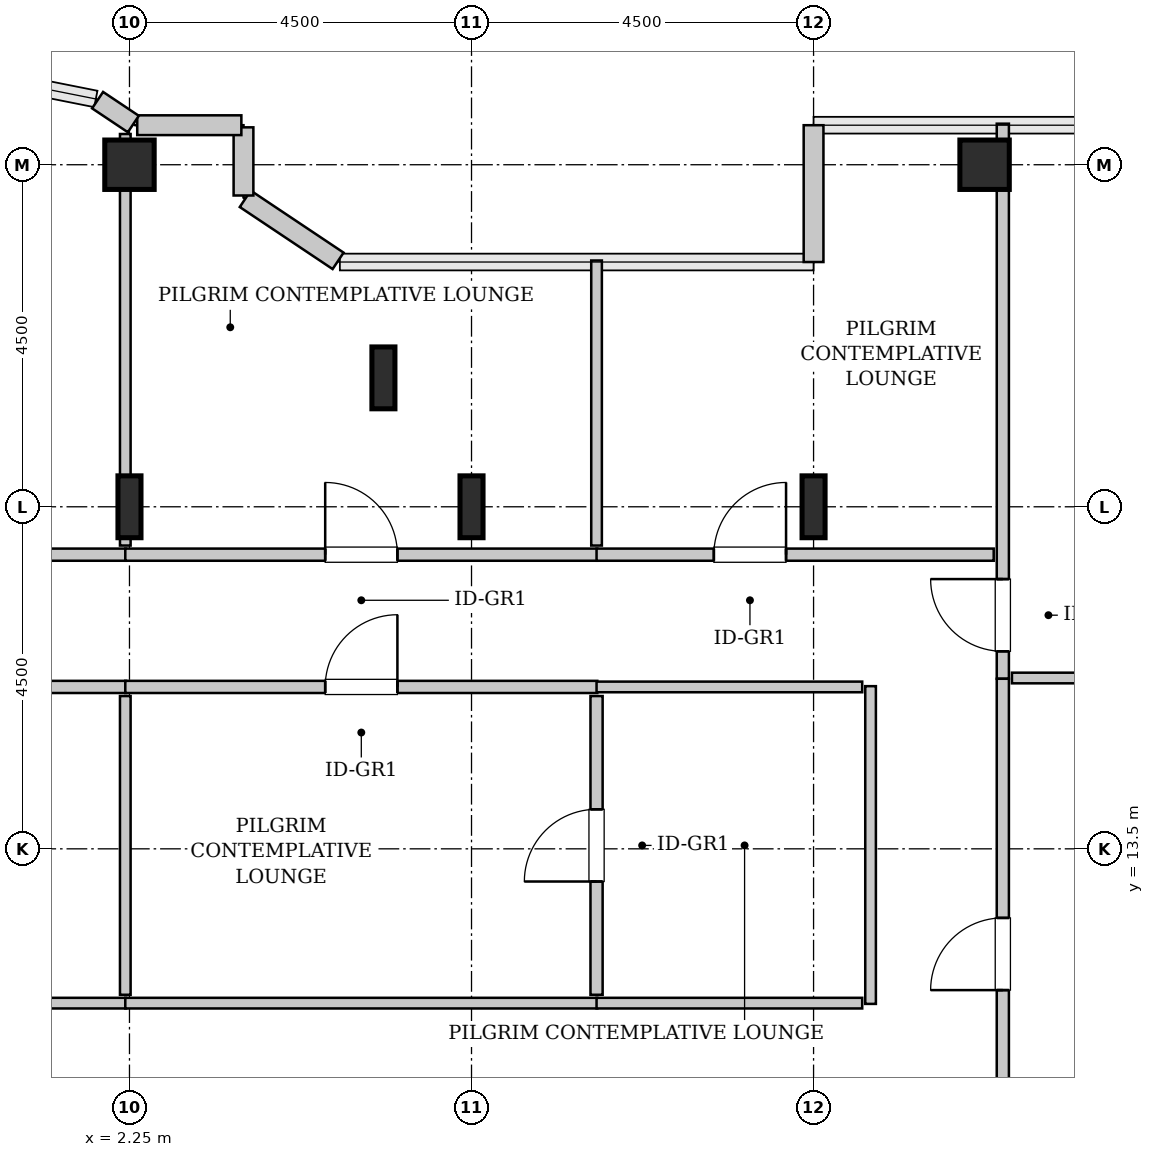
"""IFC4 building model, lengths in metres.
Left out: names, types, materials, properties, quantities, classifications, styles, units other than length and angle.
Written with IfcOpenShell. Run it as: python <this file> out.ifc"""

import sys

from ifc_helpers import new_model, si_unit, direction, frame, frame_2d, origin, origin_2d, place, context, subcontext, project, spatial, rectangle, hollow_rectangle, i_section, extrude, source, transform, mapped, element, fill, save


model = new_model("IFC4")
c1 = context("Model", 3, precision=1e-05, world=origin(), true_north=direction((0.0, 1.0)))
c2 = subcontext(c1, "Body", "Model", "MODEL_VIEW")
j1 = project(units=[si_unit("LENGTHUNIT", "METRE"), si_unit("PLANEANGLEUNIT", "RADIAN")], contexts=[c1])
p1 = place(None, origin())
s1 = spatial("IfcSite", under=j1, at=p1, CompositionType="ELEMENT")
p2 = place(p1, origin())
s2 = spatial("IfcBuilding", under=s1, at=p2, CompositionType="ELEMENT")
p3 = place(p2, frame((0.0, 0.0, 244.6)))
s3 = spatial("IfcBuildingStorey", under=s2, at=p3, CompositionType="ELEMENT", Elevation=244.6)
m1 = source(origin(), c2, "Body", "SweptSolid", [
    extrude(i_section(OverallWidth=0.303, OverallDepth=0.814, WebThickness=0.021, FlangeThickness=0.04, FilletRadius=0.03, at=origin_2d()), origin(), (0.0, 0.0, 1.0), 3.8),
])
p4 = place(p3, frame((2.25, 18.0, 0.0), z_axis=(0.0, 0.0, 1.0), x_axis=(1.0, 0.0, 0.0)))
e1 = element("IfcColumn", 1, at=p4, inside=s3, PredefinedType="COLUMN", context=c2, shape_type="MappedRepresentation", body=[
    mapped(m1, transform((0.0, 0.0, 0.0), x_axis=(1.0, 0.0, 0.0), y_axis=(0.0, 1.0, 0.0), z_axis=(0.0, 0.0, 1.0), scale=1.0)),
])
m2 = source(origin(), c2, "Body", "SweptSolid", [
    extrude(hollow_rectangle(XDim=0.65, YDim=0.65, WallThickness=0.032, InnerFilletRadius=0.032, OuterFilletRadius=0.064, at=origin_2d()), origin(), (0.0, 0.0, 1.0), 3.8),
])
p5 = place(p3, frame((2.25, 22.5, 0.0), z_axis=(0.0, 0.0, 1.0), x_axis=(1.0, 0.0, 0.0)))
e2 = element("IfcColumn", 2, at=p5, inside=s3, PredefinedType="COLUMN", context=c2, shape_type="MappedRepresentation", body=[
    mapped(m2, transform((0.0, 0.0, 0.0), x_axis=(1.0, 0.0, 0.0), y_axis=(0.0, 1.0, 0.0), z_axis=(0.0, 0.0, 1.0), scale=1.0)),
])
for number, where, z_axis, x_axis in (
    (3, (5.591, 19.696, 0.0), (0.0, 0.0, 1.0), (1.0, 0.0, 0.0)),
    (4, (6.75, 18.0, 0.0), (0.0, 0.0, 1.0), (1.0, 0.0, 0.0)),
    (5, (11.25, 18.0, 0.0), (0.0, 0.0, 1.0), (1.0, 0.0, 0.0)),
):
    element("IfcColumn", number, at=place(p3, frame(where, z_axis=z_axis, x_axis=x_axis)), inside=s3, PredefinedType="COLUMN", context=c2, shape_type="MappedRepresentation", body=[
        mapped(m1, transform((0.0, 0.0, 0.0), x_axis=(1.0, 0.0, 0.0), y_axis=(0.0, 1.0, 0.0), z_axis=(0.0, 0.0, 1.0), scale=1.0)),
    ])
p6 = place(p3, frame((13.5, 22.5, 0.0), z_axis=(0.0, 0.0, 1.0), x_axis=(1.0, 0.0, 0.0)))
e6 = element("IfcColumn", 6, at=p6, inside=s3, PredefinedType="COLUMN", context=c2, shape_type="MappedRepresentation", body=[
    mapped(m2, transform((0.0, 0.0, 0.0), x_axis=(1.0, 0.0, 0.0), y_axis=(0.0, 1.0, 0.0), z_axis=(0.0, 0.0, 1.0), scale=1.0)),
])
m3 = source(origin(), c2, "Body", "SweptSolid", [
    extrude(rectangle(XDim=1.8, YDim=0.26, at=frame_2d((0.9, 0.0))), origin(), (0.0, 0.0, 1.0), 3.55),
])
p7 = place(p3, frame((11.25, 23.02, 0.0), z_axis=(0.0, 0.0, 1.0), x_axis=(0.0, -1.0, 0.0)))
e7 = element("IfcWall", 7, at=p7, inside=s3, PredefinedType="SOLIDWALL", context=c2, shape_type="MappedRepresentation", body=[
    mapped(m3, transform((0.0, 0.0, 0.0), x_axis=(1.0, 0.0, 0.0), y_axis=(0.0, 1.0, 0.0), z_axis=(0.0, 0.0, 1.0), scale=1.0)),
])
m4 = source(origin(), c2, "Body", "SweptSolid", [
    extrude(rectangle(XDim=1.469, YDim=0.26, at=frame_2d((0.734, 0.0))), origin(), (0.0, 0.0, 1.0), 3.55),
])
p8 = place(p3, frame((4.995, 21.236, 0.0), z_axis=(0.0, 0.0, 1.0), x_axis=(-0.831461760506, 0.555581983884, 0.0)))
e8 = element("IfcWall", 8, at=p8, inside=s3, PredefinedType="SOLIDWALL", context=c2, shape_type="MappedRepresentation", body=[
    mapped(m4, transform((0.0, 0.0, 0.0), x_axis=(1.0, 0.0, 0.0), y_axis=(0.0, 1.0, 0.0), z_axis=(0.0, 0.0, 1.0), scale=1.0)),
])
m5 = source(origin(), c2, "Body", "SweptSolid", [
    extrude(rectangle(XDim=0.897, YDim=0.26, at=frame_2d((0.448, 0.0))), origin(), (0.0, 0.0, 1.0), 3.55),
])
p9 = place(p3, frame((3.75, 22.095, 0.0), z_axis=(0.0, 0.0, 1.0), x_axis=(0.0, 1.0, 0.0)))
e9 = element("IfcWall", 9, at=p9, inside=s3, PredefinedType="SOLIDWALL", context=c2, shape_type="MappedRepresentation", body=[
    mapped(m5, transform((0.0, 0.0, 0.0), x_axis=(1.0, 0.0, 0.0), y_axis=(0.0, 1.0, 0.0), z_axis=(0.0, 0.0, 1.0), scale=1.0)),
])
m6 = source(origin(), c2, "Body", "SweptSolid", [
    extrude(rectangle(XDim=1.37, YDim=0.26, at=frame_2d((0.685, 0.0))), origin(), (0.0, 0.0, 1.0), 3.55),
])
p10 = place(p3, frame((3.722, 23.02, 0.0), z_axis=(0.0, 0.0, 1.0), x_axis=(-1.0, 0.0, 0.0)))
e10 = element("IfcWall", 10, at=p10, inside=s3, PredefinedType="SOLIDWALL", context=c2, shape_type="MappedRepresentation", body=[
    mapped(m6, transform((0.0, 0.0, 0.0), x_axis=(1.0, 0.0, 0.0), y_axis=(0.0, 1.0, 0.0), z_axis=(0.0, 0.0, 1.0), scale=1.0)),
])
m7 = source(origin(), c2, "Body", "SweptSolid", [
    extrude(rectangle(XDim=0.565, YDim=0.26, at=frame_2d((0.283, 0.0))), origin(), (0.0, 0.0, 1.0), 3.55),
])
p11 = place(p3, frame((2.301, 23.036, 0.0), z_axis=(0.0, 0.0, 1.0), x_axis=(-0.831651492666, 0.555297933317, 0.0)))
e11 = element("IfcWall", 11, at=p11, inside=s3, PredefinedType="SOLIDWALL", context=c2, shape_type="MappedRepresentation", body=[
    mapped(m7, transform((0.0, 0.0, 0.0), x_axis=(1.0, 0.0, 0.0), y_axis=(0.0, 1.0, 0.0), z_axis=(0.0, 0.0, 1.0), scale=1.0)),
])
m8 = source(origin(), c2, "Body", "SweptSolid", [
    extrude(rectangle(XDim=7.302, YDim=0.16, at=frame_2d((3.651, 0.0))), origin(), (0.0, 0.0, 1.0), 3.535),
])
p12 = place(p3, frame((13.74, 15.738, 0.0), z_axis=(0.0, 0.0, 1.0), x_axis=(0.0, 1.0, 0.0)))
e12 = element("IfcWall", 12, at=p12, inside=s3, PredefinedType="PARTITIONING", context=c2, shape_type="MappedRepresentation", body=[
    mapped(m8, transform((0.0, 0.0, 0.0), x_axis=(1.0, 0.0, 0.0), y_axis=(0.0, 1.0, 0.0), z_axis=(0.0, 0.0, 1.0), scale=1.0)),
])
p13 = place(p12, frame((0.361, 0.0, 0.0)))
e13 = element("IfcOpeningElement", 13, at=p13, cuts=e12, PredefinedType="OPENING", context=c2, shape_type="SweptSolid", body=[
    extrude(rectangle(XDim=0.95, YDim=2.1, at=frame_2d((0.475, 1.05))), frame((0.0, 0.09, 0.0), z_axis=(0.0, -1.0, 0.0), x_axis=(1.0, 0.0, 0.0)), (0.0, 0.0, 1.0), 0.18),
])
m9 = source(origin(), c2, "Body", "SweptSolid", [
    extrude(rectangle(XDim=11.43, YDim=0.14, at=frame_2d((5.715, 0.0))), origin(), (0.0, 0.0, 1.0), 3.535),
])
p14 = place(p3, frame((13.86, 15.748, 0.0), z_axis=(0.0, 0.0, 1.0), x_axis=(1.0, 0.0, 0.0)))
e14 = element("IfcWall", 14, at=p14, inside=s3, PredefinedType="PARTITIONING", context=c2, shape_type="MappedRepresentation", body=[
    mapped(m9, transform((0.0, 0.0, 0.0), x_axis=(1.0, 0.0, 0.0), y_axis=(0.0, 1.0, 0.0), z_axis=(0.0, 0.0, 1.0), scale=1.0)),
])
m10 = source(origin(), c2, "Body", "SweptSolid", [
    extrude(rectangle(XDim=7.242, YDim=0.16, at=frame_2d((3.621, 0.0))), origin(), (0.0, 0.0, 1.0), 3.535),
])
p15 = place(p3, frame((13.74, 8.495, 0.0), z_axis=(0.0, 0.0, 1.0), x_axis=(0.0, 1.0, 0.0)))
e15 = element("IfcWall", 15, at=p15, inside=s3, PredefinedType="PARTITIONING", context=c2, shape_type="MappedRepresentation", body=[
    mapped(m10, transform((0.0, 0.0, 0.0), x_axis=(1.0, 0.0, 0.0), y_axis=(0.0, 1.0, 0.0), z_axis=(0.0, 0.0, 1.0), scale=1.0)),
])
p16 = place(p15, frame((3.146, 0.0, 0.0)))
e16 = element("IfcOpeningElement", 16, at=p16, cuts=e15, PredefinedType="OPENING", context=c2, shape_type="SweptSolid", body=[
    extrude(rectangle(XDim=0.95, YDim=2.1, at=frame_2d((0.475, 1.05))), frame((0.0, 0.09, 0.0), z_axis=(0.0, -1.0, 0.0), x_axis=(1.0, 0.0, 0.0)), (0.0, 0.0, 1.0), 0.18),
])
m11 = source(origin(), c2, "Body", "SweptSolid", [
    extrude(rectangle(XDim=7.21, YDim=0.16, at=frame_2d((3.605, 0.0))), origin(), (0.0, 0.0, 1.0), 3.535),
])
p17 = place(p3, frame((-5.005, 17.37, 0.0), z_axis=(0.0, 0.0, 1.0), x_axis=(1.0, 0.0, 0.0)))
e17 = element("IfcWall", 17, at=p17, inside=s3, PredefinedType="PARTITIONING", context=c2, shape_type="MappedRepresentation", body=[
    mapped(m11, transform((0.0, 0.0, 0.0), x_axis=(1.0, 0.0, 0.0), y_axis=(0.0, 1.0, 0.0), z_axis=(0.0, 0.0, 1.0), scale=1.0)),
])
p18 = place(p17, frame((3.13, 0.0, 0.0)))
e18 = element("IfcOpeningElement", 18, at=p18, cuts=e17, PredefinedType="OPENING", context=c2, shape_type="SweptSolid", body=[
    extrude(rectangle(XDim=0.95, YDim=2.1, at=frame_2d((0.475, 1.05))), frame((0.0, 0.09, 0.0), z_axis=(0.0, -1.0, 0.0), x_axis=(1.0, 0.0, 0.0)), (0.0, 0.0, 1.0), 0.18),
])
m12 = source(origin(), c2, "Body", "SweptSolid", [
    extrude(rectangle(XDim=5.414, YDim=0.14, at=frame_2d((2.707, 0.0))), origin(), (0.0, 0.0, 1.0), 2.925),
])
p19 = place(p3, frame((2.195, 17.49, 0.0), z_axis=(0.0, 0.0, 1.0), x_axis=(0.0, 1.0, 0.0)))
e19 = element("IfcWall", 19, at=p19, inside=s3, PredefinedType="PARTITIONING", context=c2, shape_type="MappedRepresentation", body=[
    mapped(m12, transform((0.0, 0.0, 0.0), x_axis=(1.0, 0.0, 0.0), y_axis=(0.0, 1.0, 0.0), z_axis=(0.0, 0.0, 1.0), scale=1.0)),
])
p20 = place(p3, frame((-5.005, 15.63, 0.0), z_axis=(0.0, 0.0, 1.0), x_axis=(1.0, 0.0, 0.0)))
e20 = element("IfcWall", 20, at=p20, inside=s3, PredefinedType="PARTITIONING", context=c2, shape_type="MappedRepresentation", body=[
    mapped(m11, transform((0.0, 0.0, 0.0), x_axis=(1.0, 0.0, 0.0), y_axis=(0.0, 1.0, 0.0), z_axis=(0.0, 0.0, 1.0), scale=1.0)),
])
p21 = place(p20, frame((3.13, 0.0, 0.0)))
e21 = element("IfcOpeningElement", 21, at=p21, cuts=e20, PredefinedType="OPENING", context=c2, shape_type="SweptSolid", body=[
    extrude(rectangle(XDim=0.95, YDim=2.1, at=frame_2d((0.475, 1.05))), frame((0.0, 0.09, 0.0), z_axis=(0.0, -1.0, 0.0), x_axis=(1.0, 0.0, 0.0)), (0.0, 0.0, 1.0), 0.18),
])
m13 = source(origin(), c2, "Body", "SweptSolid", [
    extrude(rectangle(XDim=7.21, YDim=0.14, at=frame_2d((3.605, 0.0))), origin(), (0.0, 0.0, 1.0), 3.535),
])
p22 = place(p3, frame((-5.005, 11.47, 0.0), z_axis=(0.0, 0.0, 1.0), x_axis=(1.0, 0.0, 0.0)))
e22 = element("IfcWall", 22, at=p22, inside=s3, PredefinedType="PARTITIONING", context=c2, shape_type="MappedRepresentation", body=[
    mapped(m13, transform((0.0, 0.0, 0.0), x_axis=(1.0, 0.0, 0.0), y_axis=(0.0, 1.0, 0.0), z_axis=(0.0, 0.0, 1.0), scale=1.0)),
])
m14 = source(origin(), c2, "Body", "SweptSolid", [
    extrude(rectangle(XDim=3.93, YDim=0.14, at=frame_2d((1.965, 0.0))), origin(), (0.0, 0.0, 1.0), 3.535),
])
p23 = place(p3, frame((2.195, 11.58, 0.0), z_axis=(0.0, 0.0, 1.0), x_axis=(0.0, 1.0, 0.0)))
e23 = element("IfcWall", 23, at=p23, inside=s3, PredefinedType="PARTITIONING", context=c2, shape_type="MappedRepresentation", body=[
    mapped(m14, transform((0.0, 0.0, 0.0), x_axis=(1.0, 0.0, 0.0), y_axis=(0.0, 1.0, 0.0), z_axis=(0.0, 0.0, 1.0), scale=1.0)),
])
m15 = source(origin(), c2, "Body", "SweptSolid", [
    extrude(rectangle(XDim=6.21, YDim=0.16, at=frame_2d((3.105, 0.0))), origin(), (0.0, 0.0, 1.0), 3.535),
])
p24 = place(p3, frame((2.195, 17.37, 0.0), z_axis=(0.0, 0.0, 1.0), x_axis=(1.0, 0.0, 0.0)))
e24 = element("IfcWall", 24, at=p24, inside=s3, PredefinedType="PARTITIONING", context=c2, shape_type="MappedRepresentation", body=[
    mapped(m15, transform((0.0, 0.0, 0.0), x_axis=(1.0, 0.0, 0.0), y_axis=(0.0, 1.0, 0.0), z_axis=(0.0, 0.0, 1.0), scale=1.0)),
])
p25 = place(p24, frame((2.63, 0.0, 0.0)))
e25 = element("IfcOpeningElement", 25, at=p25, cuts=e24, PredefinedType="OPENING", context=c2, shape_type="SweptSolid", body=[
    extrude(rectangle(XDim=0.95, YDim=2.1, at=frame_2d((0.475, 1.05))), frame((0.0, 0.09, 0.0), z_axis=(0.0, -1.0, 0.0), x_axis=(1.0, 0.0, 0.0)), (0.0, 0.0, 1.0), 0.18),
])
m16 = source(origin(), c2, "Body", "SweptSolid", [
    extrude(rectangle(XDim=3.75, YDim=0.14, at=frame_2d((1.875, 0.0))), origin(), (0.0, 0.0, 1.0), 3.535),
])
p26 = place(p3, frame((8.395, 17.49, 0.0), z_axis=(0.0, 0.0, 1.0), x_axis=(0.0, 1.0, 0.0)))
e26 = element("IfcWall", 26, at=p26, inside=s3, PredefinedType="PARTITIONING", context=c2, shape_type="MappedRepresentation", body=[
    mapped(m16, transform((0.0, 0.0, 0.0), x_axis=(1.0, 0.0, 0.0), y_axis=(0.0, 1.0, 0.0), z_axis=(0.0, 0.0, 1.0), scale=1.0)),
])
p27 = place(p3, frame((2.195, 15.63, 0.0), z_axis=(0.0, 0.0, 1.0), x_axis=(1.0, 0.0, 0.0)))
e27 = element("IfcWall", 27, at=p27, inside=s3, PredefinedType="PARTITIONING", context=c2, shape_type="MappedRepresentation", body=[
    mapped(m15, transform((0.0, 0.0, 0.0), x_axis=(1.0, 0.0, 0.0), y_axis=(0.0, 1.0, 0.0), z_axis=(0.0, 0.0, 1.0), scale=1.0)),
])
p28 = place(p27, frame((2.63, 0.0, 0.0)))
e28 = element("IfcOpeningElement", 28, at=p28, cuts=e27, PredefinedType="OPENING", context=c2, shape_type="SweptSolid", body=[
    extrude(rectangle(XDim=0.95, YDim=2.1, at=frame_2d((0.475, 1.05))), frame((0.0, 0.09, 0.0), z_axis=(0.0, -1.0, 0.0), x_axis=(1.0, 0.0, 0.0)), (0.0, 0.0, 1.0), 0.18),
])
m17 = source(origin(), c2, "Body", "SweptSolid", [
    extrude(rectangle(XDim=6.21, YDim=0.14, at=frame_2d((3.105, 0.0))), origin(), (0.0, 0.0, 1.0), 3.535),
])
p29 = place(p3, frame((2.195, 11.47, 0.0), z_axis=(0.0, 0.0, 1.0), x_axis=(1.0, 0.0, 0.0)))
e29 = element("IfcWall", 29, at=p29, inside=s3, PredefinedType="PARTITIONING", context=c2, shape_type="MappedRepresentation", body=[
    mapped(m17, transform((0.0, 0.0, 0.0), x_axis=(1.0, 0.0, 0.0), y_axis=(0.0, 1.0, 0.0), z_axis=(0.0, 0.0, 1.0), scale=1.0)),
])
m18 = source(origin(), c2, "Body", "SweptSolid", [
    extrude(rectangle(XDim=3.93, YDim=0.16, at=frame_2d((1.965, 0.0))), origin(), (0.0, 0.0, 1.0), 3.535),
])
p30 = place(p3, frame((8.395, 11.58, 0.0), z_axis=(0.0, 0.0, 1.0), x_axis=(0.0, 1.0, 0.0)))
e30 = element("IfcWall", 30, at=p30, inside=s3, PredefinedType="PARTITIONING", context=c2, shape_type="MappedRepresentation", body=[
    mapped(m18, transform((0.0, 0.0, 0.0), x_axis=(1.0, 0.0, 0.0), y_axis=(0.0, 1.0, 0.0), z_axis=(0.0, 0.0, 1.0), scale=1.0)),
])
p31 = place(p30, frame((1.49, 0.0, 0.0)))
e31 = element("IfcOpeningElement", 31, at=p31, cuts=e30, PredefinedType="OPENING", context=c2, shape_type="SweptSolid", body=[
    extrude(rectangle(XDim=0.95, YDim=2.1, at=frame_2d((0.475, 1.05))), frame((0.0, 0.09, 0.0), z_axis=(0.0, -1.0, 0.0), x_axis=(1.0, 0.0, 0.0)), (0.0, 0.0, 1.0), 0.18),
])
m19 = source(origin(), c2, "Body", "SweptSolid", [
    extrude(rectangle(XDim=5.225, YDim=0.16, at=frame_2d((2.613, 0.0))), origin(), (0.0, 0.0, 1.0), 3.535),
])
p32 = place(p3, frame((8.395, 17.37, 0.0), z_axis=(0.0, 0.0, 1.0), x_axis=(1.0, 0.0, 0.0)))
e32 = element("IfcWall", 32, at=p32, inside=s3, PredefinedType="PARTITIONING", context=c2, shape_type="MappedRepresentation", body=[
    mapped(m19, transform((0.0, 0.0, 0.0), x_axis=(1.0, 0.0, 0.0), y_axis=(0.0, 1.0, 0.0), z_axis=(0.0, 0.0, 1.0), scale=1.0)),
])
p33 = place(p32, frame((1.543, 0.0, 0.0)))
e33 = element("IfcOpeningElement", 33, at=p33, cuts=e32, PredefinedType="OPENING", context=c2, shape_type="SweptSolid", body=[
    extrude(rectangle(XDim=0.95, YDim=2.1, at=frame_2d((0.475, 1.05))), frame((0.0, 0.09, 0.0), z_axis=(0.0, -1.0, 0.0), x_axis=(1.0, 0.0, 0.0)), (0.0, 0.0, 1.0), 0.18),
])
m20 = source(origin(), c2, "Body", "SweptSolid", [
    extrude(rectangle(XDim=4.18, YDim=0.14, at=frame_2d((2.09, 0.0))), origin(), (0.0, 0.0, 1.0), 3.535),
])
p34 = place(p3, frame((12.0, 11.46, 0.0), z_axis=(0.0, 0.0, 1.0), x_axis=(0.0, 1.0, 0.0)))
e34 = element("IfcWall", 34, at=p34, inside=s3, PredefinedType="PARTITIONING", context=c2, shape_type="MappedRepresentation", body=[
    mapped(m20, transform((0.0, 0.0, 0.0), x_axis=(1.0, 0.0, 0.0), y_axis=(0.0, 1.0, 0.0), z_axis=(0.0, 0.0, 1.0), scale=1.0)),
])
m21 = source(origin(), c2, "Body", "SweptSolid", [
    extrude(rectangle(XDim=3.495, YDim=0.14, at=frame_2d((1.748, 0.0))), origin(), (0.0, 0.0, 1.0), 3.535),
])
for number, where, z_axis, x_axis in (
    (35, (8.395, 15.63, 0.0), (0.0, 0.0, 1.0), (1.0, 0.0, 0.0)),
    (36, (8.395, 11.47, 0.0), (0.0, 0.0, 1.0), (1.0, 0.0, 0.0)),
):
    element("IfcWall", number, at=place(p3, frame(where, z_axis=z_axis, x_axis=x_axis)), inside=s3, PredefinedType="PARTITIONING", context=c2, shape_type="MappedRepresentation", body=[
        mapped(m21, transform((0.0, 0.0, 0.0), x_axis=(1.0, 0.0, 0.0), y_axis=(0.0, 1.0, 0.0), z_axis=(0.0, 0.0, 1.0), scale=1.0)),
    ])
m22 = source(origin(), c2, "Body", "SweptSolid", [
    extrude(rectangle(XDim=0.95, YDim=2.1, at=frame_2d((0.475, 1.05))), frame((0.0, 0.025, 0.0), z_axis=(0.0, -1.0, 0.0), x_axis=(1.0, 0.0, 0.0)), (0.0, 0.0, 1.0), 0.05),
])
p35 = place(p13, origin())
e37 = element("IfcDoor", 37, at=p35, inside=s3, OperationType="SINGLE_SWING_RIGHT", PredefinedType="DOOR", context=c2, shape_type="MappedRepresentation", body=[
    mapped(m22, transform((0.0, 0.0, 0.0), x_axis=(1.0, 0.0, 0.0), y_axis=(0.0, 1.0, 0.0), z_axis=(0.0, 0.0, 1.0), scale=1.0)),
])
fill(e13, e37)
p36 = place(p16, origin())
e38 = element("IfcDoor", 38, at=p36, inside=s3, OperationType="SINGLE_SWING_LEFT", PredefinedType="DOOR", context=c2, shape_type="MappedRepresentation", body=[
    mapped(m22, transform((0.0, 0.0, 0.0), x_axis=(1.0, 0.0, 0.0), y_axis=(0.0, 1.0, 0.0), z_axis=(0.0, 0.0, 1.0), scale=1.0)),
])
fill(e16, e38)
p37 = place(p25, origin())
e39 = element("IfcDoor", 39, at=p37, inside=s3, OperationType="SINGLE_SWING_LEFT", PredefinedType="DOOR", context=c2, shape_type="MappedRepresentation", body=[
    mapped(m22, transform((0.0, 0.0, 0.0), x_axis=(1.0, 0.0, 0.0), y_axis=(0.0, 1.0, 0.0), z_axis=(0.0, 0.0, 1.0), scale=1.0)),
])
fill(e25, e39)
p38 = place(p28, origin())
e40 = element("IfcDoor", 40, at=p38, inside=s3, OperationType="SINGLE_SWING_RIGHT", PredefinedType="DOOR", context=c2, shape_type="MappedRepresentation", body=[
    mapped(m22, transform((0.0, 0.0, 0.0), x_axis=(1.0, 0.0, 0.0), y_axis=(0.0, 1.0, 0.0), z_axis=(0.0, 0.0, 1.0), scale=1.0)),
])
fill(e28, e40)
p39 = place(p31, origin())
e41 = element("IfcDoor", 41, at=p39, inside=s3, OperationType="SINGLE_SWING_LEFT", PredefinedType="DOOR", context=c2, shape_type="MappedRepresentation", body=[
    mapped(m22, transform((0.0, 0.0, 0.0), x_axis=(1.0, 0.0, 0.0), y_axis=(0.0, 1.0, 0.0), z_axis=(0.0, 0.0, 1.0), scale=1.0)),
])
fill(e31, e41)
p40 = place(p33, origin())
e42 = element("IfcDoor", 42, at=p40, inside=s3, OperationType="SINGLE_SWING_RIGHT", PredefinedType="DOOR", context=c2, shape_type="MappedRepresentation", body=[
    mapped(m22, transform((0.0, 0.0, 0.0), x_axis=(1.0, 0.0, 0.0), y_axis=(0.0, 1.0, 0.0), z_axis=(0.0, 0.0, 1.0), scale=1.0)),
])
fill(e33, e42)
save(model, sys.argv[1])
